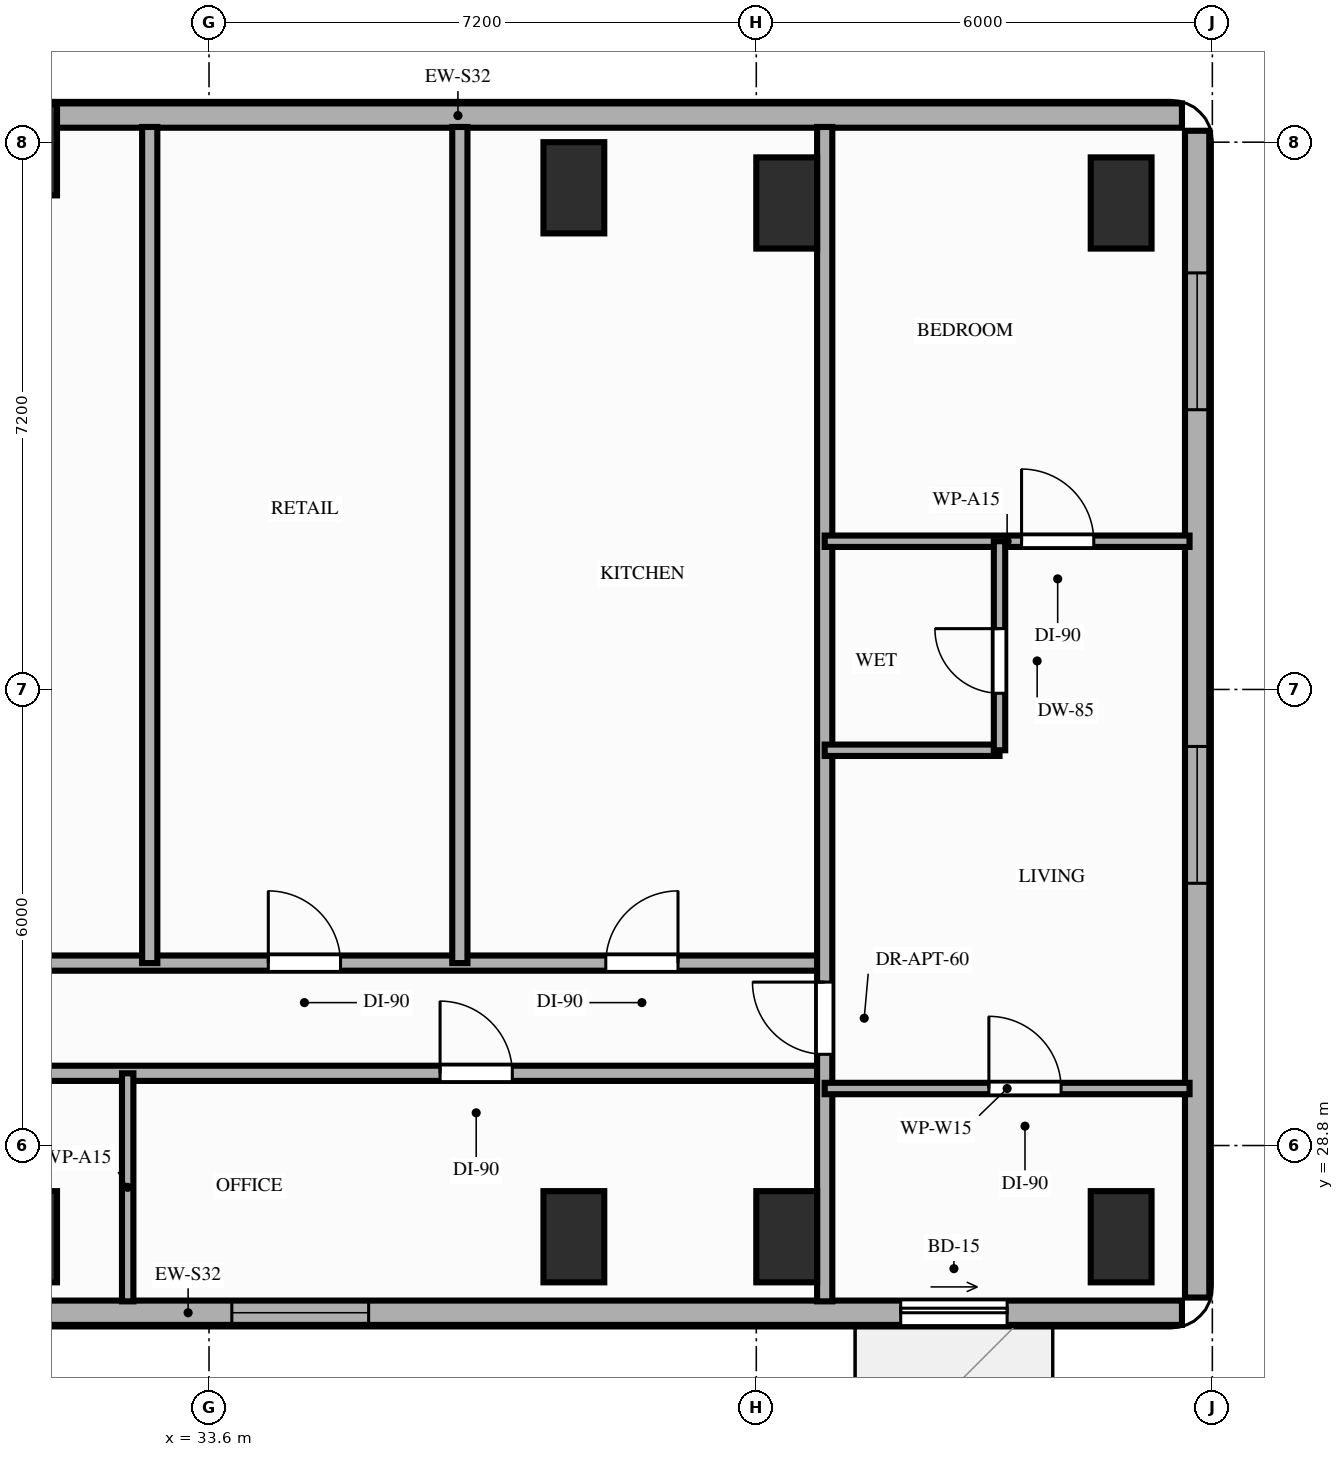
"""IFC4 building model, lengths in metres.
Left out: names, types, materials, properties, quantities, classifications, styles, units other than length and angle.
Written with IfcOpenShell. Run it as: python <this file> out.ifc"""

import sys

from ifc_helpers import new_model, si_unit, direction, frame, frame_2d, origin, origin_2d, place, context, subcontext, project, spatial, rectangle, extrude, element, fill, save


model = new_model("IFC4")
c1 = context("Model", 3, precision=1e-05, world=origin(), true_north=direction((0.0, 1.0)))
c2 = subcontext(c1, "Body", "Model", "MODEL_VIEW")
j1 = project(units=[si_unit("LENGTHUNIT", "METRE"), si_unit("PLANEANGLEUNIT", "RADIAN")], contexts=[c1])
p1 = place(None, origin())
s1 = spatial("IfcSite", under=j1, at=p1, CompositionType="ELEMENT")
p2 = place(p1, origin())
s2 = spatial("IfcBuilding", under=s1, at=p2, CompositionType="ELEMENT")
p3 = place(p2, frame((0.0, 0.0, 86.6)))
s3 = spatial("IfcBuildingStorey", under=s2, at=p3, CompositionType="ELEMENT", Elevation=86.6)
for number, where, z_axis, x_axis in (
    (1, (31.2, 27.6, 0.0), (0.0, 0.0, 1.0), (1.0, 0.0, 0.0)),
    (2, (31.2, 41.9, 0.0), (0.0, 0.0, 1.0), (1.0, 0.0, 0.0)),
    (3, (38.4, 27.6, 0.0), (0.0, 0.0, 1.0), (1.0, 0.0, 0.0)),
    (4, (38.4, 41.4, 0.0), (0.0, 0.0, 1.0), (1.0, 0.0, 0.0)),
    (5, (41.2, 27.6, 0.0), (0.0, 0.0, 1.0), (1.0, 0.0, 0.0)),
    (6, (41.2, 41.2, 0.0), (0.0, 0.0, 1.0), (1.0, 0.0, 0.0)),
    (7, (45.6, 27.6, 0.0), (0.0, 0.0, 1.0), (1.0, 0.0, 0.0)),
    (8, (45.6, 41.2, 0.0), (0.0, 0.0, 1.0), (1.0, 0.0, 0.0)),
):
    element("IfcColumn", number, at=place(p3, frame(where, z_axis=z_axis, x_axis=x_axis)), inside=s3, PredefinedType="COLUMN", context=c2, shape_type="SweptSolid", body=[
        extrude(rectangle(XDim=0.8, YDim=1.2, at=origin_2d()), origin(), (0.0, 0.0, 1.0), 3.2),
    ])
p4 = place(p3, frame((46.4, 42.35, 0.0), z_axis=(0.0, 0.0, 1.0), x_axis=(-1.0, 0.0, 0.0)))
e9 = element("IfcWall", 9, at=p4, inside=s3, PredefinedType="STANDARD", context=c2, shape_type="SweptSolid", body=[
    extrude(rectangle(XDim=19.05, YDim=0.32, at=frame_2d((9.525, 0.0))), origin(), (0.0, 0.0, 1.0), 2.4),
])
p5 = place(p3, frame((20.25, 26.6, 0.0), z_axis=(0.0, 0.0, 1.0), x_axis=(1.0, 0.0, 0.0)))
e10 = element("IfcWall", 10, at=p5, inside=s3, PredefinedType="STANDARD", context=c2, shape_type="SweptSolid", body=[
    extrude(rectangle(XDim=26.15, YDim=0.32, at=frame_2d((13.075, 0.0))), origin(), (0.0, 0.0, 1.0), 2.7),
])
p6 = place(p5, frame((7.95, 0.0, 0.0)))
e11 = element("IfcOpeningElement", 11, at=p6, cuts=e10, PredefinedType="OPENING", context=c2, shape_type="SweptSolid", body=[
    extrude(rectangle(XDim=1.4, YDim=2.1, at=frame_2d((0.7, 1.05))), frame((0.0, 0.17, 0.0), z_axis=(0.0, -1.0, 0.0), x_axis=(1.0, 0.0, 0.0)), (0.0, 0.0, 1.0), 0.34),
])
p7 = place(p5, frame((22.45, 0.0, 0.0)))
e12 = element("IfcOpeningElement", 12, at=p7, cuts=e10, PredefinedType="OPENING", context=c2, shape_type="SweptSolid", body=[
    extrude(rectangle(XDim=1.4, YDim=2.1, at=frame_2d((0.7, 1.05))), frame((0.0, 0.17, 0.0), z_axis=(0.0, -1.0, 0.0), x_axis=(1.0, 0.0, 0.0)), (0.0, 0.0, 1.0), 0.34),
])
p8 = place(p5, frame((2.25, 0.0, 0.85)))
e13 = element("IfcOpeningElement", 13, at=p8, cuts=e10, PredefinedType="OPENING", context=c2, shape_type="SweptSolid", body=[
    extrude(rectangle(XDim=1.8, YDim=1.6, at=frame_2d((0.9, 0.8))), frame((0.0, 0.17, 0.0), z_axis=(0.0, -1.0, 0.0), x_axis=(1.0, 0.0, 0.0)), (0.0, 0.0, 1.0), 0.34),
])
p9 = place(p5, frame((13.65, 0.0, 0.85)))
e14 = element("IfcOpeningElement", 14, at=p9, cuts=e10, PredefinedType="OPENING", context=c2, shape_type="SweptSolid", body=[
    extrude(rectangle(XDim=1.8, YDim=1.6, at=frame_2d((0.9, 0.8))), frame((0.0, 0.17, 0.0), z_axis=(0.0, -1.0, 0.0), x_axis=(1.0, 0.0, 0.0)), (0.0, 0.0, 1.0), 0.34),
])
p10 = place(p3, frame((46.6, 26.8, 0.0), z_axis=(0.0, 0.0, 1.0), x_axis=(0.0, 1.0, 0.0)))
e15 = element("IfcWall", 15, at=p10, inside=s3, PredefinedType="STANDARD", context=c2, shape_type="SweptSolid", body=[
    extrude(rectangle(XDim=15.35, YDim=0.32, at=frame_2d((7.675, 0.0))), origin(), (0.0, 0.0, 1.0), 3.02),
])
p11 = place(p10, frame((5.45, 0.0, 0.85)))
e16 = element("IfcOpeningElement", 16, at=p11, cuts=e15, PredefinedType="OPENING", context=c2, shape_type="SweptSolid", body=[
    extrude(rectangle(XDim=1.8, YDim=1.75, at=frame_2d((0.9, 0.875))), frame((0.0, 0.17, 0.0), z_axis=(0.0, -1.0, 0.0), x_axis=(1.0, 0.0, 0.0)), (0.0, 0.0, 1.0), 0.34),
])
p12 = place(p10, frame((11.68, 0.0, 0.85)))
e17 = element("IfcOpeningElement", 17, at=p12, cuts=e15, PredefinedType="OPENING", context=c2, shape_type="SweptSolid", body=[
    extrude(rectangle(XDim=1.8, YDim=1.75, at=frame_2d((0.9, 0.875))), frame((0.0, 0.17, 0.0), z_axis=(0.0, -1.0, 0.0), x_axis=(1.0, 0.0, 0.0)), (0.0, 0.0, 1.0), 0.34),
])
p13 = place(p3, frame((27.15, 29.75, 0.0), z_axis=(0.0, 0.0, 1.0), x_axis=(1.0, 0.0, 0.0)))
e18 = element("IfcWall", 18, at=p13, inside=s3, PredefinedType="PARTITIONING", context=c2, shape_type="SweptSolid", body=[
    extrude(rectangle(XDim=14.55, YDim=0.2, at=frame_2d((7.275, 0.0))), origin(), (0.0, 0.0, 1.0), 2.4),
])
p14 = place(p13, frame((2.21, 0.0, 0.0)))
e19 = element("IfcOpeningElement", 19, at=p14, cuts=e18, PredefinedType="OPENING", context=c2, shape_type="SweptSolid", body=[
    extrude(rectangle(XDim=0.95, YDim=2.15, at=frame_2d((0.475, 1.075))), frame((0.0, 0.11, 0.0), z_axis=(0.0, -1.0, 0.0), x_axis=(1.0, 0.0, 0.0)), (0.0, 0.0, 1.0), 0.22),
])
p15 = place(p13, frame((9.49, 0.0, 0.0)))
e20 = element("IfcOpeningElement", 20, at=p15, cuts=e18, PredefinedType="OPENING", context=c2, shape_type="SweptSolid", body=[
    extrude(rectangle(XDim=0.95, YDim=2.15, at=frame_2d((0.475, 1.075))), frame((0.0, 0.11, 0.0), z_axis=(0.0, -1.0, 0.0), x_axis=(1.0, 0.0, 0.0)), (0.0, 0.0, 1.0), 0.22),
])
p16 = place(p3, frame((27.15, 31.2, 0.0), z_axis=(0.0, 0.0, 1.0), x_axis=(1.0, 0.0, 0.0)))
e21 = element("IfcWall", 21, at=p16, inside=s3, PredefinedType="PARTITIONING", context=c2, shape_type="SweptSolid", body=[
    extrude(rectangle(XDim=14.55, YDim=0.2, at=frame_2d((7.275, 0.0))), origin(), (0.0, 0.0, 1.0), 2.4),
])
p17 = place(p16, frame((2.36, 0.0, 0.0)))
e22 = element("IfcOpeningElement", 22, at=p17, cuts=e21, PredefinedType="OPENING", context=c2, shape_type="SweptSolid", body=[
    extrude(rectangle(XDim=0.95, YDim=2.15, at=frame_2d((0.475, 1.075))), frame((0.0, 0.11, 0.0), z_axis=(0.0, -1.0, 0.0), x_axis=(1.0, 0.0, 0.0)), (0.0, 0.0, 1.0), 0.22),
])
p18 = place(p16, frame((7.23, 0.0, 0.0)))
e23 = element("IfcOpeningElement", 23, at=p18, cuts=e21, PredefinedType="OPENING", context=c2, shape_type="SweptSolid", body=[
    extrude(rectangle(XDim=0.95, YDim=2.15, at=frame_2d((0.475, 1.075))), frame((0.0, 0.11, 0.0), z_axis=(0.0, -1.0, 0.0), x_axis=(1.0, 0.0, 0.0)), (0.0, 0.0, 1.0), 0.22),
])
p19 = place(p16, frame((11.67, 0.0, 0.0)))
e24 = element("IfcOpeningElement", 24, at=p19, cuts=e21, PredefinedType="OPENING", context=c2, shape_type="SweptSolid", body=[
    extrude(rectangle(XDim=0.95, YDim=2.15, at=frame_2d((0.475, 1.075))), frame((0.0, 0.11, 0.0), z_axis=(0.0, -1.0, 0.0), x_axis=(1.0, 0.0, 0.0)), (0.0, 0.0, 1.0), 0.22),
])
p20 = place(p3, frame((41.7, 26.75, 0.0), z_axis=(0.0, 0.0, 1.0), x_axis=(0.0, 1.0, 0.0)))
e25 = element("IfcWall", 25, at=p20, inside=s3, PredefinedType="PARTITIONING", context=c2, shape_type="SweptSolid", body=[
    extrude(rectangle(XDim=15.45, YDim=0.2, at=frame_2d((7.725, 0.0))), origin(), (0.0, 0.0, 1.0), 2.4),
])
p21 = place(p20, frame((3.25, 0.0, 0.0)))
e26 = element("IfcOpeningElement", 26, at=p21, cuts=e25, PredefinedType="OPENING", context=c2, shape_type="SweptSolid", body=[
    extrude(rectangle(XDim=0.95, YDim=2.15, at=frame_2d((0.475, 1.075))), frame((0.0, 0.11, 0.0), z_axis=(0.0, -1.0, 0.0), x_axis=(1.0, 0.0, 0.0)), (0.0, 0.0, 1.0), 0.22),
])
p22 = place(p3, frame((41.7, 29.55, 0.0), z_axis=(0.0, 0.0, 1.0), x_axis=(1.0, 0.0, 0.0)))
e27 = element("IfcWall", 27, at=p22, inside=s3, PredefinedType="PARTITIONING", context=c2, shape_type="SweptSolid", body=[
    extrude(rectangle(XDim=4.8, YDim=0.15, at=frame_2d((2.4, 0.0))), origin(), (0.0, 0.0, 1.0), 2.4),
])
p23 = place(p22, frame((2.16, 0.0, 0.0)))
e28 = element("IfcOpeningElement", 28, at=p23, cuts=e27, PredefinedType="OPENING", context=c2, shape_type="SweptSolid", body=[
    extrude(rectangle(XDim=0.95, YDim=2.15, at=frame_2d((0.475, 1.075))), frame((0.0, 0.085, 0.0), z_axis=(0.0, -1.0, 0.0), x_axis=(1.0, 0.0, 0.0)), (0.0, 0.0, 1.0), 0.17),
])
p24 = place(p3, frame((41.7, 36.75, 0.0), z_axis=(0.0, 0.0, 1.0), x_axis=(1.0, 0.0, 0.0)))
e29 = element("IfcWall", 29, at=p24, inside=s3, PredefinedType="PARTITIONING", context=c2, shape_type="SweptSolid", body=[
    extrude(rectangle(XDim=4.8, YDim=0.15, at=frame_2d((2.4, 0.0))), origin(), (0.0, 0.0, 1.0), 2.4),
])
p25 = place(p24, frame((2.59, 0.0, 0.0)))
e30 = element("IfcOpeningElement", 30, at=p25, cuts=e29, PredefinedType="OPENING", context=c2, shape_type="SweptSolid", body=[
    extrude(rectangle(XDim=0.95, YDim=2.15, at=frame_2d((0.475, 1.075))), frame((0.0, 0.085, 0.0), z_axis=(0.0, -1.0, 0.0), x_axis=(1.0, 0.0, 0.0)), (0.0, 0.0, 1.0), 0.17),
])
p26 = place(p3, frame((41.7, 34.0, 0.0), z_axis=(0.0, 0.0, 1.0), x_axis=(1.0, 0.0, 0.0)))
e31 = element("IfcWall", 31, at=p26, inside=s3, PredefinedType="PARTITIONING", context=c2, shape_type="SweptSolid", body=[
    extrude(rectangle(XDim=2.3, YDim=0.15, at=frame_2d((1.15, 0.0))), origin(), (0.0, 0.0, 1.0), 3.02),
])
p27 = place(p3, frame((44.0, 34.0, 0.0), z_axis=(0.0, 0.0, 1.0), x_axis=(0.0, 1.0, 0.0)))
e32 = element("IfcWall", 32, at=p27, inside=s3, PredefinedType="PARTITIONING", context=c2, shape_type="SweptSolid", body=[
    extrude(rectangle(XDim=2.75, YDim=0.15, at=frame_2d((1.375, 0.0))), origin(), (0.0, 0.0, 1.0), 2.6),
])
p28 = place(p27, frame((0.75, 0.0, 0.0)))
e33 = element("IfcOpeningElement", 33, at=p28, cuts=e32, PredefinedType="OPENING", context=c2, shape_type="SweptSolid", body=[
    extrude(rectangle(XDim=0.85, YDim=2.1, at=frame_2d((0.425, 1.05))), frame((0.0, 0.085, 0.0), z_axis=(0.0, -1.0, 0.0), x_axis=(1.0, 0.0, 0.0)), (0.0, 0.0, 1.0), 0.17),
])
p29 = place(p3, frame((32.53, 26.75, 0.0), z_axis=(0.0, 0.0, 1.0), x_axis=(0.0, 1.0, 0.0)))
e34 = element("IfcWall", 34, at=p29, inside=s3, PredefinedType="PARTITIONING", context=c2, shape_type="SweptSolid", body=[
    extrude(rectangle(XDim=3.0, YDim=0.15, at=frame_2d((1.5, 0.0))), origin(), (0.0, 0.0, 1.0), 2.4),
])
for number, where, z_axis, x_axis in (
    (35, (32.82, 31.2, 0.0), (0.0, 0.0, 1.0), (0.0, 1.0, 0.0)),
    (36, (36.9, 31.2, 0.0), (0.0, 0.0, 1.0), (0.0, 1.0, 0.0)),
):
    element("IfcWall", number, at=place(p3, frame(where, z_axis=z_axis, x_axis=x_axis)), inside=s3, PredefinedType="PARTITIONING", context=c2, shape_type="SweptSolid", body=[
        extrude(rectangle(XDim=11.0, YDim=0.2, at=frame_2d((5.5, 0.0))), origin(), (0.0, 0.0, 1.0), 2.4),
    ])
p30 = place(p7, origin())
e37 = element("IfcDoor", 37, at=p30, inside=s3, OperationType="SLIDING_TO_RIGHT", PredefinedType="DOOR", context=c2, shape_type="SweptSolid", body=[
    extrude(rectangle(XDim=1.4, YDim=2.1, at=frame_2d((0.7, 1.05))), frame((0.0, 0.025, 0.0), z_axis=(0.0, -1.0, 0.0), x_axis=(1.0, 0.0, 0.0)), (0.0, 0.0, 1.0), 0.05),
])
fill(e12, e37)
p31 = place(p11, origin())
e38 = element("IfcWindow", 38, at=p31, inside=s3, PartitioningType="SINGLE_PANEL", PredefinedType="WINDOW", context=c2, shape_type="SweptSolid", body=[
    extrude(rectangle(XDim=1.8, YDim=1.75, at=frame_2d((0.9, 0.875))), frame((0.0, 0.03, 0.0), z_axis=(0.0, -1.0, 0.0), x_axis=(1.0, 0.0, 0.0)), (0.0, 0.0, 1.0), 0.06),
])
fill(e16, e38)
p32 = place(p12, origin())
e39 = element("IfcWindow", 39, at=p32, inside=s3, PartitioningType="SINGLE_PANEL", PredefinedType="WINDOW", context=c2, shape_type="SweptSolid", body=[
    extrude(rectangle(XDim=1.8, YDim=1.75, at=frame_2d((0.9, 0.875))), frame((0.0, 0.03, 0.0), z_axis=(0.0, -1.0, 0.0), x_axis=(1.0, 0.0, 0.0)), (0.0, 0.0, 1.0), 0.06),
])
fill(e17, e39)
p33 = place(p9, origin())
e40 = element("IfcWindow", 40, at=p33, inside=s3, PartitioningType="SINGLE_PANEL", PredefinedType="WINDOW", context=c2, shape_type="SweptSolid", body=[
    extrude(rectangle(XDim=1.8, YDim=1.6, at=frame_2d((0.9, 0.8))), frame((0.0, 0.03, 0.0), z_axis=(0.0, -1.0, 0.0), x_axis=(1.0, 0.0, 0.0)), (0.0, 0.0, 1.0), 0.06),
])
fill(e14, e40)
p34 = place(p21, origin())
e41 = element("IfcDoor", 41, at=p34, inside=s3, OperationType="SINGLE_SWING_RIGHT", PredefinedType="DOOR", context=c2, shape_type="SweptSolid", body=[
    extrude(rectangle(XDim=0.95, YDim=2.15, at=frame_2d((0.475, 1.075))), frame((0.0, 0.025, 0.0), z_axis=(0.0, -1.0, 0.0), x_axis=(1.0, 0.0, 0.0)), (0.0, 0.0, 1.0), 0.05),
])
fill(e26, e41)
p35 = place(p25, origin())
e42 = element("IfcDoor", 42, at=p35, inside=s3, OperationType="SINGLE_SWING_LEFT", PredefinedType="DOOR", context=c2, shape_type="SweptSolid", body=[
    extrude(rectangle(XDim=0.95, YDim=2.15, at=frame_2d((0.475, 1.075))), frame((0.0, 0.025, 0.0), z_axis=(0.0, -1.0, 0.0), x_axis=(1.0, 0.0, 0.0)), (0.0, 0.0, 1.0), 0.05),
])
fill(e30, e42)
p36 = place(p28, origin())
e43 = element("IfcDoor", 43, at=p36, inside=s3, OperationType="SINGLE_SWING_RIGHT", PredefinedType="DOOR", context=c2, shape_type="SweptSolid", body=[
    extrude(rectangle(XDim=0.85, YDim=2.1, at=frame_2d((0.425, 1.05))), frame((0.0, 0.025, 0.0), z_axis=(0.0, -1.0, 0.0), x_axis=(1.0, 0.0, 0.0)), (0.0, 0.0, 1.0), 0.05),
])
fill(e33, e43)
p37 = place(p23, origin())
e44 = element("IfcDoor", 44, at=p37, inside=s3, OperationType="SINGLE_SWING_LEFT", PredefinedType="DOOR", context=c2, shape_type="SweptSolid", body=[
    extrude(rectangle(XDim=0.95, YDim=2.15, at=frame_2d((0.475, 1.075))), frame((0.0, 0.025, 0.0), z_axis=(0.0, -1.0, 0.0), x_axis=(1.0, 0.0, 0.0)), (0.0, 0.0, 1.0), 0.05),
])
fill(e28, e44)
p38 = place(p15, origin())
e45 = element("IfcDoor", 45, at=p38, inside=s3, OperationType="SINGLE_SWING_LEFT", PredefinedType="DOOR", context=c2, shape_type="SweptSolid", body=[
    extrude(rectangle(XDim=0.95, YDim=2.15, at=frame_2d((0.475, 1.075))), frame((0.0, 0.025, 0.0), z_axis=(0.0, -1.0, 0.0), x_axis=(1.0, 0.0, 0.0)), (0.0, 0.0, 1.0), 0.05),
])
fill(e20, e45)
p39 = place(p18, origin())
e46 = element("IfcDoor", 46, at=p39, inside=s3, OperationType="SINGLE_SWING_LEFT", PredefinedType="DOOR", context=c2, shape_type="SweptSolid", body=[
    extrude(rectangle(XDim=0.95, YDim=2.15, at=frame_2d((0.475, 1.075))), frame((0.0, 0.025, 0.0), z_axis=(0.0, -1.0, 0.0), x_axis=(1.0, 0.0, 0.0)), (0.0, 0.0, 1.0), 0.05),
])
fill(e23, e46)
p40 = place(p19, origin())
e47 = element("IfcDoor", 47, at=p40, inside=s3, OperationType="SINGLE_SWING_RIGHT", PredefinedType="DOOR", context=c2, shape_type="SweptSolid", body=[
    extrude(rectangle(XDim=0.95, YDim=2.15, at=frame_2d((0.475, 1.075))), frame((0.0, 0.025, 0.0), z_axis=(0.0, -1.0, 0.0), x_axis=(1.0, 0.0, 0.0)), (0.0, 0.0, 1.0), 0.05),
])
fill(e24, e47)
save(model, sys.argv[1])
